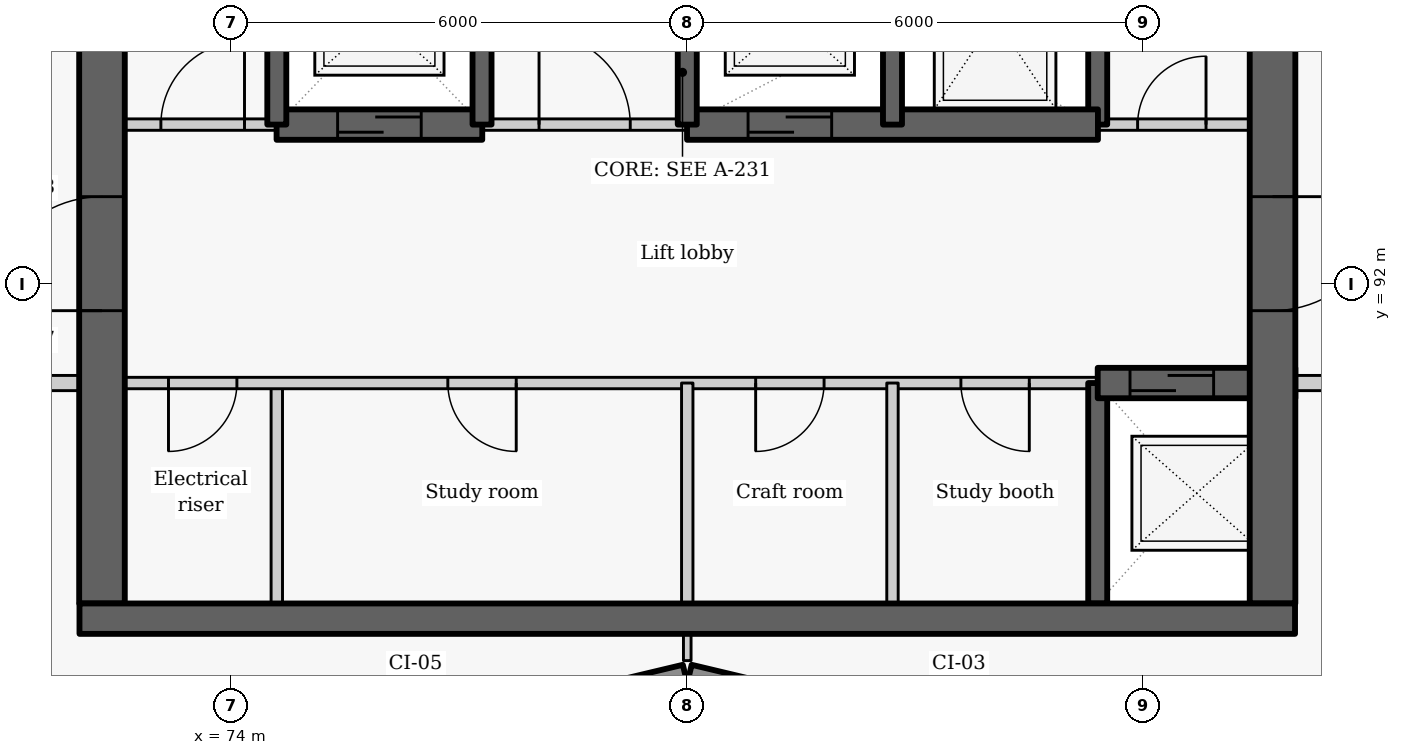
"""IFC4 building model, lengths in metres.
Left out: names, types, materials, properties, quantities, classifications, styles, units other than length and angle.
Written with IfcOpenShell. Run it as: python <this file> out.ifc"""

import sys

from ifc_helpers import new_model, si_unit, direction, frame, frame_2d, origin, place, context, subcontext, project, spatial, rectangle, extrude, element, fill, save


model = new_model("IFC4")
c1 = context("Model", 3, precision=1e-05, world=origin(), true_north=direction((0.0, 1.0)))
c2 = subcontext(c1, "Body", "Model", "MODEL_VIEW")
j1 = project(units=[si_unit("LENGTHUNIT", "METRE"), si_unit("PLANEANGLEUNIT", "RADIAN")], contexts=[c1])
p1 = place(None, origin())
s1 = spatial("IfcSite", under=j1, at=p1, CompositionType="ELEMENT")
p2 = place(p1, origin())
s2 = spatial("IfcBuilding", under=s1, at=p2, CompositionType="ELEMENT")
p3 = place(p2, frame((0.0, 0.0, 176.7)))
s3 = spatial("IfcBuildingStorey", under=s2, at=p3, CompositionType="ELEMENT", Elevation=176.7)
p4 = place(p3, frame((76.814, 86.119, 0.0), z_axis=(0.0, 0.0, 1.0), x_axis=(0.972773113459, 0.231759508395, 0.0)))
e1 = element("IfcWall", 1, at=p4, inside=s3, PredefinedType="SOLIDWALL", context=c2, shape_type="SweptSolid", body=[
    extrude(rectangle(XDim=3.246, YDim=0.25, at=frame_2d((1.623, 0.0))), origin(), (0.0, 0.0, 1.0), 2.425),
])
p5 = place(p4, frame((0.573, 0.0, 0.9)))
e2 = element("IfcOpeningElement", 2, at=p5, cuts=e1, PredefinedType="OPENING", context=c2, shape_type="SweptSolid", body=[
    extrude(rectangle(XDim=2.1, YDim=1.1, at=frame_2d((1.05, 0.55))), frame((0.0, 0.135, 0.0), z_axis=(0.0, -1.0, 0.0), x_axis=(1.0, 0.0, 0.0)), (0.0, 0.0, 1.0), 0.27),
])
p6 = place(p3, frame((80.029, 86.872, 0.0), z_axis=(0.0, 0.0, 1.0), x_axis=(0.972773113459, -0.231759508395, 0.0)))
e3 = element("IfcWall", 3, at=p6, inside=s3, PredefinedType="SOLIDWALL", context=c2, shape_type="SweptSolid", body=[
    extrude(rectangle(XDim=3.246, YDim=0.25, at=frame_2d((1.623, 0.0))), origin(), (0.0, 0.0, 1.0), 2.425),
])
p7 = place(p6, frame((0.573, 0.0, 0.9)))
e4 = element("IfcOpeningElement", 4, at=p7, cuts=e3, PredefinedType="OPENING", context=c2, shape_type="SweptSolid", body=[
    extrude(rectangle(XDim=2.1, YDim=1.1, at=frame_2d((1.05, 0.55))), frame((0.0, 0.135, 0.0), z_axis=(0.0, -1.0, 0.0), x_axis=(1.0, 0.0, 0.0)), (0.0, 0.0, 1.0), 0.27),
])
p8 = place(p3, frame((74.6, 87.8, 0.0), z_axis=(0.0, 0.0, 1.0), x_axis=(0.0, 1.0, 0.0)))
e5 = element("IfcWall", 5, at=p8, inside=s3, PredefinedType="PARTITIONING", context=c2, shape_type="SweptSolid", body=[
    extrude(rectangle(XDim=2.9, YDim=0.15, at=frame_2d((1.45, 0.0))), origin(), (0.0, 0.0, 1.0), 3.025),
])
p9 = place(p3, frame((85.4, 90.7, 0.0), z_axis=(0.0, 0.0, 1.0), x_axis=(-1.0, 0.0, 0.0)))
e6 = element("IfcWall", 6, at=p9, inside=s3, PredefinedType="PARTITIONING", context=c2, shape_type="SweptSolid", body=[
    extrude(rectangle(XDim=13.4, YDim=0.15, at=frame_2d((6.7, 0.0))), origin(), (0.0, 0.0, 1.0), 3.025),
])
p10 = place(p9, frame((11.325, 0.0, 0.0)))
e7 = element("IfcOpeningElement", 7, at=p10, cuts=e6, PredefinedType="OPENING", context=c2, shape_type="SweptSolid", body=[
    extrude(rectangle(XDim=0.9, YDim=2.1, at=frame_2d((0.45, 1.05))), frame((0.0, 0.085, 0.0), z_axis=(0.0, -1.0, 0.0), x_axis=(1.0, 0.0, 0.0)), (0.0, 0.0, 1.0), 0.17),
])
p11 = place(p9, frame((7.65, 0.0, 0.0)))
e8 = element("IfcOpeningElement", 8, at=p11, cuts=e6, PredefinedType="OPENING", context=c2, shape_type="SweptSolid", body=[
    extrude(rectangle(XDim=0.9, YDim=2.1, at=frame_2d((0.45, 1.05))), frame((0.0, 0.085, 0.0), z_axis=(0.0, -1.0, 0.0), x_axis=(1.0, 0.0, 0.0)), (0.0, 0.0, 1.0), 0.17),
])
p12 = place(p9, frame((3.6, 0.0, 0.0)))
e9 = element("IfcOpeningElement", 9, at=p12, cuts=e6, PredefinedType="OPENING", context=c2, shape_type="SweptSolid", body=[
    extrude(rectangle(XDim=0.9, YDim=2.1, at=frame_2d((0.45, 1.05))), frame((0.0, 0.085, 0.0), z_axis=(0.0, -1.0, 0.0), x_axis=(1.0, 0.0, 0.0)), (0.0, 0.0, 1.0), 0.17),
])
p13 = place(p9, frame((0.9, 0.0, 0.0)))
e10 = element("IfcOpeningElement", 10, at=p13, cuts=e6, PredefinedType="OPENING", context=c2, shape_type="SweptSolid", body=[
    extrude(rectangle(XDim=0.9, YDim=2.1, at=frame_2d((0.45, 1.05))), frame((0.0, 0.085, 0.0), z_axis=(0.0, -1.0, 0.0), x_axis=(1.0, 0.0, 0.0)), (0.0, 0.0, 1.0), 0.17),
])
p14 = place(p3, frame((72.3, 87.8, -0.41), z_axis=(0.0, 0.0, 1.0), x_axis=(0.0, 1.0, 0.0)))
e11 = element("IfcWall", 11, at=p14, inside=s3, PredefinedType="SHEAR", context=c2, shape_type="SweptSolid", body=[
    extrude(rectangle(XDim=9.1, YDim=0.6, at=frame_2d((4.55, 0.0))), origin(), (0.0, 0.0, 1.0), 3.435),
])
p15 = place(p14, frame((3.852, 0.0, 0.41)))
e12 = element("IfcOpeningElement", 12, at=p15, cuts=e11, PredefinedType="OPENING", context=c2, shape_type="SweptSolid", body=[
    extrude(rectangle(XDim=1.5, YDim=2.1, at=frame_2d((0.75, 1.05))), frame((0.0, 0.31, 0.0), z_axis=(0.0, -1.0, 0.0), x_axis=(1.0, 0.0, 0.0)), (0.0, 0.0, 1.0), 0.62),
])
p16 = place(p3, frame((85.4, 87.8, -0.41), z_axis=(0.0, 0.0, 1.0), x_axis=(0.0, 1.0, 0.0)))
e13 = element("IfcWall", 13, at=p16, inside=s3, PredefinedType="SHEAR", context=c2, shape_type="SweptSolid", body=[
    extrude(rectangle(XDim=2.9, YDim=0.25, at=frame_2d((1.45, 0.0))), origin(), (0.0, 0.0, 1.0), 3.435),
])
p17 = place(p3, frame((85.4, 94.1, -0.41), z_axis=(0.0, 0.0, 1.0), x_axis=(0.0, 1.0, 0.0)))
e14 = element("IfcWall", 14, at=p17, inside=s3, PredefinedType="SHEAR", context=c2, shape_type="SweptSolid", body=[
    extrude(rectangle(XDim=2.8, YDim=0.25, at=frame_2d((1.4, 0.0))), origin(), (0.0, 0.0, 1.0), 3.435),
])
p18 = place(p3, frame((85.4, 90.7, -0.41), z_axis=(0.0, 0.0, 1.0), x_axis=(1.0, 0.0, 0.0)))
e15 = element("IfcWall", 15, at=p18, inside=s3, PredefinedType="SHEAR", context=c2, shape_type="SweptSolid", body=[
    extrude(rectangle(XDim=2.6, YDim=0.4, at=frame_2d((1.3, 0.0))), origin(), (0.0, 0.0, 1.0), 3.435),
])
p19 = place(p18, frame((0.425, 0.0, 0.41)))
e16 = element("IfcOpeningElement", 16, at=p19, cuts=e15, PredefinedType="OPENING", context=c2, shape_type="SweptSolid", body=[
    extrude(rectangle(XDim=1.1, YDim=2.1, at=frame_2d((0.55, 1.05))), frame((0.0, 0.21, 0.0), z_axis=(0.0, -1.0, 0.0), x_axis=(1.0, 0.0, 0.0)), (0.0, 0.0, 1.0), 0.42),
])
p20 = place(p3, frame((87.7, 102.05, -0.41), z_axis=(0.0, 0.0, 1.0), x_axis=(0.0, -1.0, 0.0)))
e17 = element("IfcWall", 17, at=p20, inside=s3, PredefinedType="SHEAR", context=c2, shape_type="SweptSolid", body=[
    extrude(rectangle(XDim=14.25, YDim=0.6, at=frame_2d((7.125, 0.0))), origin(), (0.0, 0.0, 1.0), 3.435),
])
p21 = place(p20, frame((8.898, 0.0, 0.41)))
e18 = element("IfcOpeningElement", 18, at=p21, cuts=e17, PredefinedType="OPENING", context=c2, shape_type="SweptSolid", body=[
    extrude(rectangle(XDim=1.5, YDim=2.1, at=frame_2d((0.75, 1.05))), frame((0.0, 0.31, 0.0), z_axis=(0.0, -1.0, 0.0), x_axis=(1.0, 0.0, 0.0)), (0.0, 0.0, 1.0), 0.62),
])
for number, where, z_axis, x_axis in (
    (19, (80.0, 87.8, 0.0), (0.0, 0.0, 1.0), (0.0, 1.0, 0.0)),
    (20, (82.7, 87.8, 0.0), (0.0, 0.0, 1.0), (0.0, 1.0, 0.0)),
):
    element("IfcWall", number, at=place(p3, frame(where, z_axis=z_axis, x_axis=x_axis)), inside=s3, PredefinedType="PARTITIONING", context=c2, shape_type="SweptSolid", body=[
        extrude(rectangle(XDim=2.9, YDim=0.15, at=frame_2d((1.45, 0.0))), origin(), (0.0, 0.0, 1.0), 3.025),
    ])
p22 = place(p3, frame((72.0, 94.1, 0.0), z_axis=(0.0, 0.0, 1.0), x_axis=(1.0, 0.0, 0.0)))
e21 = element("IfcWall", 21, at=p22, inside=s3, PredefinedType="PARTITIONING", context=c2, shape_type="SweptSolid", body=[
    extrude(rectangle(XDim=2.603, YDim=0.15, at=frame_2d((1.302, 0.0))), origin(), (0.0, 0.0, 1.0), 3.025),
])
p23 = place(p22, frame((1.075, 0.0, 0.0)))
e22 = element("IfcOpeningElement", 22, at=p23, cuts=e21, PredefinedType="OPENING", context=c2, shape_type="SweptSolid", body=[
    extrude(rectangle(XDim=1.1, YDim=2.1, at=frame_2d((0.55, 1.05))), frame((0.0, 0.085, 0.0), z_axis=(0.0, -1.0, 0.0), x_axis=(1.0, 0.0, 0.0)), (0.0, 0.0, 1.0), 0.17),
])
p24 = place(p3, frame((77.297, 94.1, 0.0), z_axis=(0.0, 0.0, 1.0), x_axis=(1.0, 0.0, 0.0)))
e23 = element("IfcWall", 23, at=p24, inside=s3, PredefinedType="PARTITIONING", context=c2, shape_type="SweptSolid", body=[
    extrude(rectangle(XDim=2.706, YDim=0.15, at=frame_2d((1.353, 0.0))), origin(), (0.0, 0.0, 1.0), 3.025),
])
p25 = place(p24, frame((0.753, 0.0, 0.0)))
e24 = element("IfcOpeningElement", 24, at=p25, cuts=e23, PredefinedType="OPENING", context=c2, shape_type="SweptSolid", body=[
    extrude(rectangle(XDim=1.2, YDim=2.1, at=frame_2d((0.6, 1.05))), frame((0.0, 0.085, 0.0), z_axis=(0.0, -1.0, 0.0), x_axis=(1.0, 0.0, 0.0)), (0.0, 0.0, 1.0), 0.17),
])
p26 = place(p3, frame((85.397, 94.1, 0.0), z_axis=(0.0, 0.0, 1.0), x_axis=(1.0, 0.0, 0.0)))
e25 = element("IfcWall", 25, at=p26, inside=s3, PredefinedType="PARTITIONING", context=c2, shape_type="SweptSolid", body=[
    extrude(rectangle(XDim=2.603, YDim=0.15, at=frame_2d((1.302, 0.0))), origin(), (0.0, 0.0, 1.0), 3.025),
])
p27 = place(p26, frame((0.528, 0.0, 0.0)))
e26 = element("IfcOpeningElement", 26, at=p27, cuts=e25, PredefinedType="OPENING", context=c2, shape_type="SweptSolid", body=[
    extrude(rectangle(XDim=0.9, YDim=2.1, at=frame_2d((0.45, 1.05))), frame((0.0, 0.085, 0.0), z_axis=(0.0, -1.0, 0.0), x_axis=(1.0, 0.0, 0.0)), (0.0, 0.0, 1.0), 0.17),
])
p28 = place(p3, frame((74.597, 94.1, -0.41), z_axis=(0.0, 0.0, 1.0), x_axis=(1.0, 0.0, 0.0)))
e27 = element("IfcWall", 27, at=p28, inside=s3, PredefinedType="SHEAR", context=c2, shape_type="SweptSolid", body=[
    extrude(rectangle(XDim=2.706, YDim=0.4, at=frame_2d((1.353, 0.0))), origin(), (0.0, 0.0, 1.0), 3.435),
])
p29 = place(p28, frame((0.803, 0.0, 0.41)))
e28 = element("IfcOpeningElement", 28, at=p29, cuts=e27, PredefinedType="OPENING", context=c2, shape_type="SweptSolid", body=[
    extrude(rectangle(XDim=1.1, YDim=2.1, at=frame_2d((0.55, 1.05))), frame((0.0, 0.21, 0.0), z_axis=(0.0, -1.0, 0.0), x_axis=(1.0, 0.0, 0.0)), (0.0, 0.0, 1.0), 0.42),
])
p30 = place(p3, frame((79.997, 94.1, -0.41), z_axis=(0.0, 0.0, 1.0), x_axis=(1.0, 0.0, 0.0)))
e29 = element("IfcWall", 29, at=p30, inside=s3, PredefinedType="SHEAR", context=c2, shape_type="SweptSolid", body=[
    extrude(rectangle(XDim=5.406, YDim=0.4, at=frame_2d((2.703, 0.0))), origin(), (0.0, 0.0, 1.0), 3.435),
])
p31 = place(p30, frame((0.803, 0.0, 0.41)))
e30 = element("IfcOpeningElement", 30, at=p31, cuts=e29, PredefinedType="OPENING", context=c2, shape_type="SweptSolid", body=[
    extrude(rectangle(XDim=1.1, YDim=2.1, at=frame_2d((0.55, 1.05))), frame((0.0, 0.21, 0.0), z_axis=(0.0, -1.0, 0.0), x_axis=(1.0, 0.0, 0.0)), (0.0, 0.0, 1.0), 0.42),
])
for number, where, z_axis, x_axis in (
    (31, (74.6, 94.1, -0.41), (0.0, 0.0, 1.0), (0.0, 1.0, 0.0)),
    (32, (77.3, 94.1, -0.41), (0.0, 0.0, 1.0), (0.0, 1.0, 0.0)),
    (33, (80.0, 94.1, -0.41), (0.0, 0.0, 1.0), (0.0, 1.0, 0.0)),
    (34, (82.7, 94.1, -0.41), (0.0, 0.0, 1.0), (0.0, 1.0, 0.0)),
):
    element("IfcWall", number, at=place(p3, frame(where, z_axis=z_axis, x_axis=x_axis)), inside=s3, PredefinedType="SHEAR", context=c2, shape_type="SweptSolid", body=[
        extrude(rectangle(XDim=2.8, YDim=0.25, at=frame_2d((1.4, 0.0))), origin(), (0.0, 0.0, 1.0), 3.435),
    ])
for number, where, z_axis, x_axis in (
    (35, (70.45, 90.7, 0.0), (0.0, 0.0, 1.0), (1.0, 0.0, 0.0)),
    (36, (88.0, 90.7, 0.0), (0.0, 0.0, 1.0), (1.0, 0.0, 0.0)),
):
    element("IfcWall", number, at=place(p3, frame(where, z_axis=z_axis, x_axis=x_axis)), inside=s3, PredefinedType="PARTITIONING", context=c2, shape_type="SweptSolid", body=[
        extrude(rectangle(XDim=1.55, YDim=0.2, at=frame_2d((0.775, 0.0))), origin(), (0.0, 0.0, 1.0), 3.025),
    ])
p32 = place(p3, frame((80.0, 87.048, 0.0), z_axis=(0.0, 0.0, 1.0), x_axis=(0.0, 1.0, 0.0)))
e37 = element("IfcWall", 37, at=p32, inside=s3, PredefinedType="PARTITIONING", context=c2, shape_type="SweptSolid", body=[
    extrude(rectangle(XDim=0.352, YDim=0.1, at=frame_2d((0.176, 0.0))), origin(), (0.0, 0.0, 1.0), 3.025),
])
p33 = place(p3, frame((72.004, 87.6, -0.41), z_axis=(0.0, 0.0, 1.0), x_axis=(1.0, 0.0, 0.0)))
e38 = element("IfcWall", 38, at=p33, inside=s3, PredefinedType="SHEAR", context=c2, shape_type="SweptSolid", body=[
    extrude(rectangle(XDim=15.992, YDim=0.4, at=frame_2d((7.996, 0.0))), origin(), (0.0, 0.0, 1.0), 3.435),
])
p34 = place(p10, origin())
e39 = element("IfcDoor", 39, at=p34, inside=s3, OperationType="SINGLE_SWING_RIGHT", PredefinedType="DOOR", context=c2, shape_type="SweptSolid", body=[
    extrude(rectangle(XDim=0.9, YDim=2.1, at=frame_2d((0.45, 1.05))), frame((0.0, 0.025, 0.0), z_axis=(0.0, -1.0, 0.0), x_axis=(1.0, 0.0, 0.0)), (0.0, 0.0, 1.0), 0.05),
])
fill(e7, e39)
p35 = place(p19, origin())
e40 = element("IfcDoor", 40, at=p35, inside=s3, OperationType="SLIDING_TO_LEFT", PredefinedType="DOOR", context=c2, shape_type="SweptSolid", body=[
    extrude(rectangle(XDim=1.1, YDim=2.1, at=frame_2d((0.55, 1.05))), frame((0.0, 0.025, 0.0), z_axis=(0.0, -1.0, 0.0), x_axis=(1.0, 0.0, 0.0)), (0.0, 0.0, 1.0), 0.05),
])
fill(e16, e40)
p36 = place(p11, origin())
e41 = element("IfcDoor", 41, at=p36, inside=s3, OperationType="SINGLE_SWING_LEFT", PredefinedType="DOOR", context=c2, shape_type="SweptSolid", body=[
    extrude(rectangle(XDim=0.9, YDim=2.1, at=frame_2d((0.45, 1.05))), frame((0.0, 0.025, 0.0), z_axis=(0.0, -1.0, 0.0), x_axis=(1.0, 0.0, 0.0)), (0.0, 0.0, 1.0), 0.05),
])
fill(e8, e41)
p37 = place(p12, origin())
e42 = element("IfcDoor", 42, at=p37, inside=s3, OperationType="SINGLE_SWING_RIGHT", PredefinedType="DOOR", context=c2, shape_type="SweptSolid", body=[
    extrude(rectangle(XDim=0.9, YDim=2.1, at=frame_2d((0.45, 1.05))), frame((0.0, 0.025, 0.0), z_axis=(0.0, -1.0, 0.0), x_axis=(1.0, 0.0, 0.0)), (0.0, 0.0, 1.0), 0.05),
])
fill(e9, e42)
p38 = place(p13, origin())
e43 = element("IfcDoor", 43, at=p38, inside=s3, OperationType="SINGLE_SWING_LEFT", PredefinedType="DOOR", context=c2, shape_type="SweptSolid", body=[
    extrude(rectangle(XDim=0.9, YDim=2.1, at=frame_2d((0.45, 1.05))), frame((0.0, 0.025, 0.0), z_axis=(0.0, -1.0, 0.0), x_axis=(1.0, 0.0, 0.0)), (0.0, 0.0, 1.0), 0.05),
])
fill(e10, e43)
p39 = place(p23, origin())
e44 = element("IfcDoor", 44, at=p39, inside=s3, OperationType="SINGLE_SWING_RIGHT", PredefinedType="DOOR", context=c2, shape_type="SweptSolid", body=[
    extrude(rectangle(XDim=1.1, YDim=2.1, at=frame_2d((0.55, 1.05))), frame((0.0, 0.025, 0.0), z_axis=(0.0, -1.0, 0.0), x_axis=(1.0, 0.0, 0.0)), (0.0, 0.0, 1.0), 0.05),
])
fill(e22, e44)
p40 = place(p29, origin())
e45 = element("IfcDoor", 45, at=p40, inside=s3, OperationType="SLIDING_TO_LEFT", PredefinedType="DOOR", context=c2, shape_type="SweptSolid", body=[
    extrude(rectangle(XDim=1.1, YDim=2.1, at=frame_2d((0.55, 1.05))), frame((0.0, 0.025, 0.0), z_axis=(0.0, -1.0, 0.0), x_axis=(1.0, 0.0, 0.0)), (0.0, 0.0, 1.0), 0.05),
])
fill(e28, e45)
p41 = place(p25, origin())
e46 = element("IfcDoor", 46, at=p41, inside=s3, OperationType="DOUBLE_DOOR_SINGLE_SWING", PredefinedType="DOOR", context=c2, shape_type="SweptSolid", body=[
    extrude(rectangle(XDim=1.2, YDim=2.1, at=frame_2d((0.6, 1.05))), frame((0.0, 0.025, 0.0), z_axis=(0.0, -1.0, 0.0), x_axis=(1.0, 0.0, 0.0)), (0.0, 0.0, 1.0), 0.05),
])
fill(e24, e46)
p42 = place(p31, origin())
e47 = element("IfcDoor", 47, at=p42, inside=s3, OperationType="SLIDING_TO_LEFT", PredefinedType="DOOR", context=c2, shape_type="SweptSolid", body=[
    extrude(rectangle(XDim=1.1, YDim=2.1, at=frame_2d((0.55, 1.05))), frame((0.0, 0.025, 0.0), z_axis=(0.0, -1.0, 0.0), x_axis=(1.0, 0.0, 0.0)), (0.0, 0.0, 1.0), 0.05),
])
fill(e30, e47)
p43 = place(p27, origin())
e48 = element("IfcDoor", 48, at=p43, inside=s3, OperationType="SINGLE_SWING_RIGHT", PredefinedType="DOOR", context=c2, shape_type="SweptSolid", body=[
    extrude(rectangle(XDim=0.9, YDim=2.1, at=frame_2d((0.45, 1.05))), frame((0.0, 0.025, 0.0), z_axis=(0.0, -1.0, 0.0), x_axis=(1.0, 0.0, 0.0)), (0.0, 0.0, 1.0), 0.05),
])
fill(e26, e48)
p44 = place(p21, origin())
e49 = element("IfcDoor", 49, at=p44, inside=s3, OperationType="DOUBLE_DOOR_SINGLE_SWING", PredefinedType="DOOR", context=c2, shape_type="SweptSolid", body=[
    extrude(rectangle(XDim=1.5, YDim=2.1, at=frame_2d((0.75, 1.05))), frame((0.0, 0.025, 0.0), z_axis=(0.0, -1.0, 0.0), x_axis=(1.0, 0.0, 0.0)), (0.0, 0.0, 1.0), 0.05),
])
fill(e18, e49)
p45 = place(p15, origin())
e50 = element("IfcDoor", 50, at=p45, inside=s3, OperationType="DOUBLE_DOOR_SINGLE_SWING", PredefinedType="DOOR", context=c2, shape_type="SweptSolid", body=[
    extrude(rectangle(XDim=1.5, YDim=2.1, at=frame_2d((0.75, 1.05))), frame((0.0, 0.025, 0.0), z_axis=(0.0, -1.0, 0.0), x_axis=(1.0, 0.0, 0.0)), (0.0, 0.0, 1.0), 0.05),
])
fill(e12, e50)
save(model, sys.argv[1])
